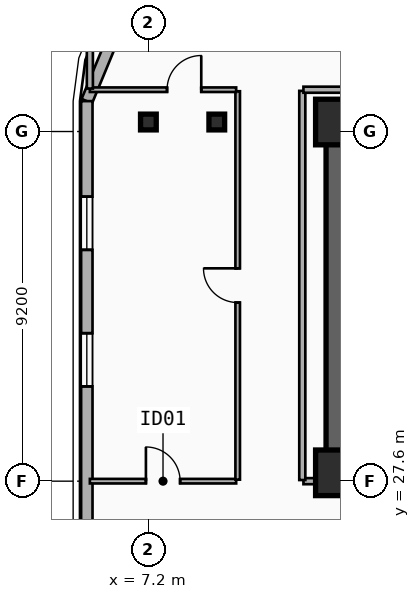
"""IFC4 building model, lengths in metres.
Left out: names, types, materials, properties, quantities, classifications, styles, units other than length and angle.
Written with IfcOpenShell. Run it as: python <this file> out.ifc"""

import sys

from ifc_helpers import new_model, si_unit, direction, frame, frame_2d, origin, origin_2d, place, context, subcontext, project, spatial, rectangle, i_section, extrude, element, fill, save


model = new_model("IFC4")
c1 = context("Model", 3, precision=1e-05, world=origin(), true_north=direction((0.0, 1.0)))
c2 = subcontext(c1, "Body", "Model", "MODEL_VIEW")
j1 = project(units=[si_unit("LENGTHUNIT", "METRE"), si_unit("PLANEANGLEUNIT", "RADIAN")], contexts=[c1])
p1 = place(None, origin())
s1 = spatial("IfcSite", under=j1, at=p1, CompositionType="ELEMENT")
p2 = place(p1, origin())
s2 = spatial("IfcBuilding", under=s1, at=p2, CompositionType="ELEMENT")
p3 = place(p2, frame((0.0, 0.0, 166.1)))
s3 = spatial("IfcBuildingStorey", under=s2, at=p3, CompositionType="ELEMENT", Elevation=166.1)
p4 = place(p3, frame((12.15, 37.05, 0.0), z_axis=(0.0, 0.0, 1.0), x_axis=(1.0, 0.0, 0.0)))
e1 = element("IfcWall", 1, at=p4, inside=s3, PredefinedType="SHEAR", context=c2, shape_type="SweptSolid", body=[
    extrude(rectangle(XDim=33.23, YDim=0.55, at=frame_2d((16.615, 0.0))), origin(), (0.0, 0.0, 1.0), 3.55),
])
p5 = place(p3, frame((21.18, 27.82, 0.0), z_axis=(0.0, 0.0, 1.0), x_axis=(-1.0, 0.0, 0.0)))
e2 = element("IfcWall", 2, at=p5, inside=s3, PredefinedType="SHEAR", context=c2, shape_type="SweptSolid", body=[
    extrude(rectangle(XDim=9.03, YDim=0.55, at=frame_2d((4.515, 0.0))), origin(), (0.0, 0.0, 1.0), 3.55),
])
p6 = place(p5, frame((2.68, 0.0, 0.0)))
e3 = element("IfcOpeningElement", 3, at=p6, cuts=e2, PredefinedType="OPENING", context=c2, shape_type="SweptSolid", body=[
    extrude(rectangle(XDim=1.1, YDim=2.15, at=frame_2d((0.55, 1.075))), frame((0.0, 0.285, 0.0), z_axis=(0.0, -1.0, 0.0), x_axis=(1.0, 0.0, 0.0)), (0.0, 0.0, 1.0), 0.57),
])
p7 = place(p3, frame((12.15, 28.095, 0.0), z_axis=(0.0, 0.0, 1.0), x_axis=(0.0, 1.0, 0.0)))
e4 = element("IfcWall", 4, at=p7, inside=s3, PredefinedType="SHEAR", context=c2, shape_type="SweptSolid", body=[
    extrude(rectangle(XDim=8.68, YDim=0.55, at=frame_2d((4.34, 0.0))), origin(), (0.0, 0.0, 1.0), 3.55),
])
for number, where, z_axis, x_axis in (
    (5, (12.2, 27.82, 0.0), (0.0, 0.0, 1.0), (1.0, 0.0, 0.0)),
    (6, (12.2, 37.05, 0.0), (0.0, 0.0, 1.0), (1.0, 0.0, 0.0)),
):
    element("IfcColumn", number, at=place(p3, frame(where, z_axis=z_axis, x_axis=x_axis)), inside=s3, PredefinedType="COLUMN", context=c2, shape_type="SweptSolid", body=[
        extrude(rectangle(XDim=1.2, YDim=1.2, at=origin_2d()), origin(), (0.0, 0.0, 1.0), 3.55),
    ])
for number, where, z_axis, x_axis in (
    (7, (9.0, 37.05, 0.0), (0.0, 0.0, 1.0), (1.0, 0.0, 0.0)),
    (8, (7.2, 37.05, 0.0), (0.0, 0.0, 1.0), (1.0, 0.0, 0.0)),
):
    element("IfcColumn", number, at=place(p3, frame(where, z_axis=z_axis, x_axis=x_axis)), inside=s3, PredefinedType="COLUMN", context=c2, shape_type="SweptSolid", body=[
        extrude(i_section(OverallWidth=0.413, OverallDepth=0.415, WebThickness=0.03, FlangeThickness=0.047, FilletRadius=0.015, at=origin_2d()), origin(), (0.0, 0.0, 1.0), 3.55),
    ])
p8 = place(p3, frame((5.58, 37.6, 0.0), z_axis=(0.0, 0.0, 1.0), x_axis=(0.382636798336, 0.92389884758, 0.0)))
e9 = element("IfcWall", 9, at=p8, inside=s3, PredefinedType="SOLIDWALL", context=c2, shape_type="SweptSolid", body=[
    extrude(rectangle(XDim=3.077, YDim=0.3, at=frame_2d((1.538, 0.0))), origin(), (0.0, 0.0, 1.0), 3.29),
])
p9 = place(p3, frame((5.58, 14.6, 0.0), z_axis=(0.0, 0.0, 1.0), x_axis=(0.0, 1.0, 0.0)))
e10 = element("IfcWall", 10, at=p9, inside=s3, PredefinedType="SOLIDWALL", context=c2, shape_type="SweptSolid", body=[
    extrude(rectangle(XDim=23.0, YDim=0.3, at=frame_2d((11.5, 0.0))), origin(), (0.0, 0.0, 1.0), 3.29),
])
p10 = place(p9, frame((15.493, 0.0, 0.34)))
e11 = element("IfcOpeningElement", 11, at=p10, cuts=e10, PredefinedType="OPENING", context=c2, shape_type="SweptSolid", body=[
    extrude(rectangle(XDim=1.4, YDim=2.1, at=frame_2d((0.7, 1.05))), frame((0.0, 0.16, 0.0), z_axis=(0.0, -1.0, 0.0), x_axis=(1.0, 0.0, 0.0)), (0.0, 0.0, 1.0), 0.32),
])
p11 = place(p9, frame((19.087, 0.0, 0.34)))
e12 = element("IfcOpeningElement", 12, at=p11, cuts=e10, PredefinedType="OPENING", context=c2, shape_type="SweptSolid", body=[
    extrude(rectangle(XDim=1.4, YDim=2.1, at=frame_2d((0.7, 1.05))), frame((0.0, 0.16, 0.0), z_axis=(0.0, -1.0, 0.0), x_axis=(1.0, 0.0, 0.0)), (0.0, 0.0, 1.0), 0.32),
])
p12 = place(p9, frame((2.83, 0.0, 0.34)))
e13 = element("IfcOpeningElement", 13, at=p12, cuts=e10, PredefinedType="OPENING", context=c2, shape_type="SweptSolid", body=[
    extrude(rectangle(XDim=1.4, YDim=2.1, at=frame_2d((0.7, 1.05))), frame((0.0, 0.16, 0.0), z_axis=(0.0, -1.0, 0.0), x_axis=(1.0, 0.0, 0.0)), (0.0, 0.0, 1.0), 0.32),
])
p13 = place(p9, frame((6.74, 0.0, 0.34)))
e14 = element("IfcOpeningElement", 14, at=p13, cuts=e10, PredefinedType="OPENING", context=c2, shape_type="SweptSolid", body=[
    extrude(rectangle(XDim=1.4, YDim=2.1, at=frame_2d((0.7, 1.05))), frame((0.0, 0.16, 0.0), z_axis=(0.0, -1.0, 0.0), x_axis=(1.0, 0.0, 0.0)), (0.0, 0.0, 1.0), 0.32),
])
p14 = place(p3, frame((5.66, 27.6, 0.0), z_axis=(0.0, 0.0, 1.0), x_axis=(1.0, 0.0, 0.0)))
e15 = element("IfcWall", 15, at=p14, inside=s3, PredefinedType="PARTITIONING", context=c2, shape_type="SweptSolid", body=[
    extrude(rectangle(XDim=3.85, YDim=0.12, at=frame_2d((1.925, 0.0))), origin(), (0.0, 0.0, 1.0), 2.62),
])
p15 = place(p14, frame((1.475, 0.0, 0.0)))
e16 = element("IfcOpeningElement", 16, at=p15, cuts=e15, PredefinedType="OPENING", context=c2, shape_type="SweptSolid", body=[
    extrude(rectangle(XDim=0.9, YDim=2.1, at=frame_2d((0.45, 1.05))), frame((0.0, 0.07, 0.0), z_axis=(0.0, -1.0, 0.0), x_axis=(1.0, 0.0, 0.0)), (0.0, 0.0, 1.0), 0.14),
])
p16 = place(p3, frame((9.55, 27.64, 0.0), z_axis=(0.0, 0.0, 1.0), x_axis=(0.0, 1.0, 0.0)))
e17 = element("IfcWall", 17, at=p16, inside=s3, PredefinedType="PARTITIONING", context=c2, shape_type="SweptSolid", body=[
    extrude(rectangle(XDim=10.22, YDim=0.12, at=frame_2d((5.11, 0.0))), origin(), (0.0, 0.0, 1.0), 2.77),
])
p17 = place(p16, frame((4.66, 0.0, 0.0)))
e18 = element("IfcOpeningElement", 18, at=p17, cuts=e17, PredefinedType="OPENING", context=c2, shape_type="SweptSolid", body=[
    extrude(rectangle(XDim=0.9, YDim=2.1, at=frame_2d((0.45, 1.05))), frame((0.0, 0.07, 0.0), z_axis=(0.0, -1.0, 0.0), x_axis=(1.0, 0.0, 0.0)), (0.0, 0.0, 1.0), 0.14),
])
p18 = place(p3, frame((5.66, 37.9, 0.0), z_axis=(0.0, 0.0, 1.0), x_axis=(1.0, 0.0, 0.0)))
e19 = element("IfcWall", 19, at=p18, inside=s3, PredefinedType="PARTITIONING", context=c2, shape_type="SweptSolid", body=[
    extrude(rectangle(XDim=3.85, YDim=0.12, at=frame_2d((1.925, 0.0))), origin(), (0.0, 0.0, 1.0), 3.29),
])
p19 = place(p18, frame((2.031, 0.0, 0.0)))
e20 = element("IfcOpeningElement", 20, at=p19, cuts=e19, PredefinedType="OPENING", context=c2, shape_type="SweptSolid", body=[
    extrude(rectangle(XDim=0.9, YDim=2.1, at=frame_2d((0.45, 1.05))), frame((0.0, 0.07, 0.0), z_axis=(0.0, -1.0, 0.0), x_axis=(1.0, 0.0, 0.0)), (0.0, 0.0, 1.0), 0.14),
])
p20 = place(p3, frame((11.28, 27.6, 0.0), z_axis=(0.0, 0.0, 1.0), x_axis=(1.0, 0.0, 0.0)))
e21 = element("IfcWall", 21, at=p20, inside=s3, PredefinedType="PARTITIONING", context=c2, shape_type="SweptSolid", body=[
    extrude(rectangle(XDim=0.84, YDim=0.16, at=frame_2d((0.42, 0.0))), origin(), (0.0, 0.0, 1.0), 2.36),
])
p21 = place(p3, frame((11.25, 27.63, 0.0), z_axis=(0.0, 0.0, 1.0), x_axis=(0.0, 1.0, 0.0)))
e22 = element("IfcWall", 22, at=p21, inside=s3, PredefinedType="PARTITIONING", context=c2, shape_type="SweptSolid", body=[
    extrude(rectangle(XDim=10.24, YDim=0.16, at=frame_2d((5.12, 0.0))), origin(), (0.0, 0.0, 1.0), 2.77),
])
p22 = place(p3, frame((11.28, 37.9, 0.0), z_axis=(0.0, 0.0, 1.0), x_axis=(1.0, 0.0, 0.0)))
e23 = element("IfcWall", 23, at=p22, inside=s3, PredefinedType="PARTITIONING", context=c2, shape_type="SweptSolid", body=[
    extrude(rectangle(XDim=35.04, YDim=0.16, at=frame_2d((17.52, 0.0))), origin(), (0.0, 0.0, 1.0), 3.29),
])
p23 = place(p3, frame((5.66, 37.93, 0.0), z_axis=(0.0, 0.0, 1.0), x_axis=(0.0, 1.0, 0.0)))
e24 = element("IfcWall", 24, at=p23, inside=s3, PredefinedType="PARTITIONING", context=c2, shape_type="SweptSolid", body=[
    extrude(rectangle(XDim=1.44, YDim=0.16, at=frame_2d((0.72, 0.0))), origin(), (0.0, 0.0, 1.0), 3.29),
])
p24 = place(p10, origin())
e25 = element("IfcWindow", 25, at=p24, inside=s3, PartitioningType="SINGLE_PANEL", PredefinedType="WINDOW", context=c2, shape_type="SweptSolid", body=[
    extrude(rectangle(XDim=1.4, YDim=2.1, at=frame_2d((0.7, 1.05))), frame((0.0, 0.03, 0.0), z_axis=(0.0, -1.0, 0.0), x_axis=(1.0, 0.0, 0.0)), (0.0, 0.0, 1.0), 0.06),
])
fill(e11, e25)
p25 = place(p11, origin())
e26 = element("IfcWindow", 26, at=p25, inside=s3, PartitioningType="SINGLE_PANEL", PredefinedType="WINDOW", context=c2, shape_type="SweptSolid", body=[
    extrude(rectangle(XDim=1.4, YDim=2.1, at=frame_2d((0.7, 1.05))), frame((0.0, 0.03, 0.0), z_axis=(0.0, -1.0, 0.0), x_axis=(1.0, 0.0, 0.0)), (0.0, 0.0, 1.0), 0.06),
])
fill(e12, e26)
p26 = place(p15, origin())
e27 = element("IfcDoor", 27, at=p26, inside=s3, OperationType="SINGLE_SWING_LEFT", PredefinedType="DOOR", context=c2, shape_type="SweptSolid", body=[
    extrude(rectangle(XDim=0.9, YDim=2.1, at=frame_2d((0.45, 1.05))), frame((0.0, 0.025, 0.0), z_axis=(0.0, -1.0, 0.0), x_axis=(1.0, 0.0, 0.0)), (0.0, 0.0, 1.0), 0.05),
])
fill(e16, e27)
p27 = place(p17, origin())
e28 = element("IfcDoor", 28, at=p27, inside=s3, OperationType="SINGLE_SWING_RIGHT", PredefinedType="DOOR", context=c2, shape_type="SweptSolid", body=[
    extrude(rectangle(XDim=0.9, YDim=2.1, at=frame_2d((0.45, 1.05))), frame((0.0, 0.025, 0.0), z_axis=(0.0, -1.0, 0.0), x_axis=(1.0, 0.0, 0.0)), (0.0, 0.0, 1.0), 0.05),
])
fill(e18, e28)
p28 = place(p19, origin())
e29 = element("IfcDoor", 29, at=p28, inside=s3, OperationType="SINGLE_SWING_RIGHT", PredefinedType="DOOR", context=c2, shape_type="SweptSolid", body=[
    extrude(rectangle(XDim=0.9, YDim=2.1, at=frame_2d((0.45, 1.05))), frame((0.0, 0.025, 0.0), z_axis=(0.0, -1.0, 0.0), x_axis=(1.0, 0.0, 0.0)), (0.0, 0.0, 1.0), 0.05),
])
fill(e20, e29)
save(model, sys.argv[1])
